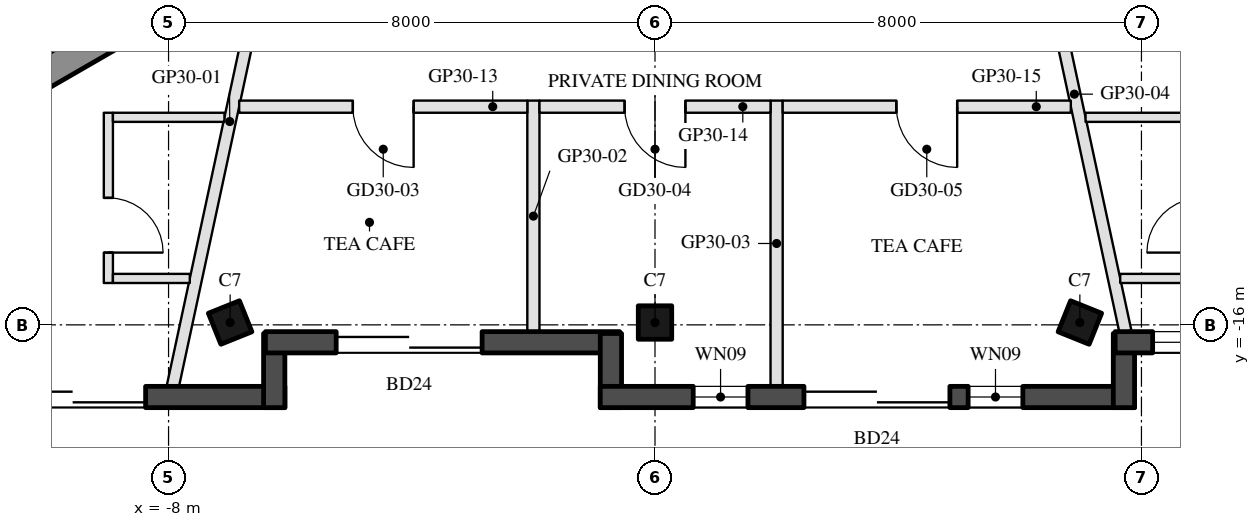
"""IFC4 building model, lengths in metres.
Left out: names, types, materials, properties, quantities, classifications, styles, units other than length and angle.
Written with IfcOpenShell. Run it as: python <this file> out.ifc"""

import sys

from ifc_helpers import new_model, si_unit, direction, frame, frame_2d, origin, origin_2d, place, context, subcontext, project, spatial, rectangle, hollow_rectangle, extrude, boolean, halfspace, element, fill, save


model = new_model("IFC4")
c1 = context("Model", 3, precision=1e-05, world=origin(), true_north=direction((0.0, 1.0)))
c2 = subcontext(c1, "Body", "Model", "MODEL_VIEW")
j1 = project(units=[si_unit("LENGTHUNIT", "METRE"), si_unit("PLANEANGLEUNIT", "RADIAN")], contexts=[c1])
p1 = place(None, origin())
s1 = spatial("IfcSite", under=j1, at=p1, CompositionType="ELEMENT")
p2 = place(p1, origin())
s2 = spatial("IfcBuilding", under=s1, at=p2, CompositionType="ELEMENT")
p3 = place(p2, frame((0.0, 0.0, 298.5)))
s3 = spatial("IfcBuildingStorey", under=s2, at=p3, CompositionType="ELEMENT", Elevation=298.5)
p4 = place(p3, frame((-6.987, -15.962, 0.0), z_axis=(0.060870463553, 0.151232178432, 0.986622326361), x_axis=(-0.998135049207, 0.004661833801, 0.060866171632)))
e1 = element("IfcColumn", 1, at=p4, inside=s3, PredefinedType="COLUMN", context=c2, shape_type="SweptSolid", body=[
    boolean("DIFFERENCE", boolean("DIFFERENCE", extrude(hollow_rectangle(XDim=0.55, YDim=0.55, WallThickness=0.025, at=origin_2d()), origin(), (0.0, 0.0, 1.0), 3.75), halfspace(frame((0.0, 0.0, 0.034), z_axis=(0.0, 0.0, 1.0), x_axis=(1.0, 0.0, 0.0)), True)), halfspace(frame((0.0, 0.0, 3.716), z_axis=(0.0, 0.0, 1.0), x_axis=(1.0, 0.0, 0.0)), False)),
])
p5 = place(p3, frame((0.0, -15.962, 0.0), z_axis=(0.0, 0.151513133163, 0.98845524455), x_axis=(-1.0, 0.0, 0.0)))
e2 = element("IfcColumn", 2, at=p5, inside=s3, PredefinedType="COLUMN", context=c2, shape_type="SweptSolid", body=[
    boolean("DIFFERENCE", boolean("DIFFERENCE", extrude(hollow_rectangle(XDim=0.55, YDim=0.55, WallThickness=0.025, at=origin_2d()), origin(), (0.0, 0.0, 1.0), 3.743), halfspace(frame((0.0, 0.0, 0.031), z_axis=(0.0, 0.0, 1.0), x_axis=(1.0, 0.0, 0.0)), True)), halfspace(frame((0.0, 0.0, 3.712), z_axis=(0.0, 0.0, 1.0), x_axis=(1.0, 0.0, 0.0)), False)),
])
p6 = place(p3, frame((6.987, -15.962, 0.0), z_axis=(-0.060870463553, 0.151232178432, 0.986622326361), x_axis=(0.998135049207, 0.004661833801, 0.060866171632)))
e3 = element("IfcColumn", 3, at=p6, inside=s3, PredefinedType="COLUMN", context=c2, shape_type="SweptSolid", body=[
    boolean("DIFFERENCE", boolean("DIFFERENCE", extrude(hollow_rectangle(XDim=0.55, YDim=0.55, WallThickness=0.025, at=origin_2d()), origin(), (0.0, 0.0, 1.0), 3.75), halfspace(frame((0.0, 0.0, 0.034), z_axis=(0.0, 0.0, 1.0), x_axis=(1.0, 0.0, 0.0)), True)), halfspace(frame((0.0, 0.0, 3.716), z_axis=(0.0, 0.0, 1.0), x_axis=(1.0, 0.0, 0.0)), False)),
])
p7 = place(p3, frame((-16.642, -17.187, 0.0), z_axis=(0.0, 0.0, 1.0), x_axis=(1.0, 0.0, 0.0)))
e4 = element("IfcWall", 4, at=p7, inside=s3, PredefinedType="SOLIDWALL", context=c2, shape_type="SweptSolid", body=[
    extrude(rectangle(XDim=10.554, YDim=0.35, at=frame_2d((5.277, 0.0))), origin(), (0.0, 0.0, 1.0), 3.55),
])
p8 = place(p7, frame((0.38, 0.0, 0.3)))
e5 = element("IfcOpeningElement", 5, at=p8, cuts=e4, PredefinedType="OPENING", context=c2, shape_type="SweptSolid", body=[
    extrude(rectangle(XDim=1.6, YDim=2.65, at=frame_2d((0.8, 1.325))), frame((0.0, 0.185, 0.0), z_axis=(0.0, -1.0, 0.0), x_axis=(1.0, 0.0, 0.0)), (0.0, 0.0, 1.0), 0.37),
])
p9 = place(p7, frame((5.864, 0.0, 0.0)))
e6 = element("IfcOpeningElement", 6, at=p9, cuts=e4, PredefinedType="OPENING", context=c2, shape_type="SweptSolid", body=[
    extrude(rectangle(XDim=2.4, YDim=2.4, at=frame_2d((1.2, 1.2))), frame((0.0, 0.185, 0.0), z_axis=(0.0, -1.0, 0.0), x_axis=(1.0, 0.0, 0.0)), (0.0, 0.0, 1.0), 0.37),
])
p10 = place(p7, frame((3.754, 0.0, 0.3)))
e7 = element("IfcOpeningElement", 7, at=p10, cuts=e4, PredefinedType="OPENING", context=c2, shape_type="SweptSolid", body=[
    extrude(rectangle(XDim=1.8, YDim=2.65, at=frame_2d((0.9, 1.325))), frame((0.0, 0.185, 0.0), z_axis=(0.0, -1.0, 0.0), x_axis=(1.0, 0.0, 0.0)), (0.0, 0.0, 1.0), 0.37),
])
p11 = place(p3, frame((-6.262, -17.362, 0.0), z_axis=(0.0, 0.0, 1.0), x_axis=(0.0, 1.0, 0.0)))
e8 = element("IfcWall", 8, at=p11, inside=s3, PredefinedType="SOLIDWALL", context=c2, shape_type="SweptSolid", body=[
    extrude(rectangle(XDim=1.22, YDim=0.35, at=frame_2d((0.61, 0.0))), origin(), (0.0, 0.0, 1.0), 3.55),
])
p12 = place(p3, frame((-6.407, -16.287, 0.0), z_axis=(0.0, 0.0, 1.0), x_axis=(1.0, 0.0, 0.0)))
e9 = element("IfcWall", 9, at=p12, inside=s3, PredefinedType="SOLIDWALL", context=c2, shape_type="SweptSolid", body=[
    extrude(rectangle(XDim=5.827, YDim=0.35, at=frame_2d((2.914, 0.0))), origin(), (0.0, 0.0, 1.0), 3.55),
])
p13 = place(p12, frame((1.164, 0.0, 0.0)))
e10 = element("IfcOpeningElement", 10, at=p13, cuts=e9, PredefinedType="OPENING", context=c2, shape_type="SweptSolid", body=[
    extrude(rectangle(XDim=2.4, YDim=2.4, at=frame_2d((1.2, 1.2))), frame((0.0, 0.185, 0.0), z_axis=(0.0, -1.0, 0.0), x_axis=(1.0, 0.0, 0.0)), (0.0, 0.0, 1.0), 0.37),
])
p14 = place(p3, frame((-0.725, -16.142, 0.0), z_axis=(0.0, 0.0, 1.0), x_axis=(0.0, -1.0, 0.0)))
e11 = element("IfcWall", 11, at=p14, inside=s3, PredefinedType="SOLIDWALL", context=c2, shape_type="SweptSolid", body=[
    extrude(rectangle(XDim=1.22, YDim=0.35, at=frame_2d((0.61, 0.0))), origin(), (0.0, 0.0, 1.0), 3.55),
])
p15 = place(p3, frame((-0.9, -17.187, 0.0), z_axis=(0.0, 0.0, 1.0), x_axis=(1.0, 0.0, 0.0)))
e12 = element("IfcWall", 12, at=p15, inside=s3, PredefinedType="SOLIDWALL", context=c2, shape_type="SweptSolid", body=[
    extrude(rectangle(XDim=8.787, YDim=0.35, at=frame_2d((4.394, 0.0))), origin(), (0.0, 0.0, 1.0), 3.55),
])
p16 = place(p15, frame((1.528, 0.0, 0.3)))
e13 = element("IfcOpeningElement", 13, at=p16, cuts=e12, PredefinedType="OPENING", context=c2, shape_type="SweptSolid", body=[
    extrude(rectangle(XDim=0.9, YDim=2.65, at=frame_2d((0.45, 1.325))), frame((0.0, 0.185, 0.0), z_axis=(0.0, -1.0, 0.0), x_axis=(1.0, 0.0, 0.0)), (0.0, 0.0, 1.0), 0.37),
])
p17 = place(p15, frame((3.35, 0.0, 0.0)))
e14 = element("IfcOpeningElement", 14, at=p17, cuts=e12, PredefinedType="OPENING", context=c2, shape_type="SweptSolid", body=[
    extrude(rectangle(XDim=2.4, YDim=2.4, at=frame_2d((1.2, 1.2))), frame((0.0, 0.185, 0.0), z_axis=(0.0, -1.0, 0.0), x_axis=(1.0, 0.0, 0.0)), (0.0, 0.0, 1.0), 0.37),
])
p18 = place(p15, frame((6.05, 0.0, 0.3)))
e15 = element("IfcOpeningElement", 15, at=p18, cuts=e12, PredefinedType="OPENING", context=c2, shape_type="SweptSolid", body=[
    extrude(rectangle(XDim=0.9, YDim=2.65, at=frame_2d((0.45, 1.325))), frame((0.0, 0.185, 0.0), z_axis=(0.0, -1.0, 0.0), x_axis=(1.0, 0.0, 0.0)), (0.0, 0.0, 1.0), 0.37),
])
p19 = place(p3, frame((7.712, -17.362, 0.0), z_axis=(0.0, 0.0, 1.0), x_axis=(0.0, 1.0, 0.0)))
e16 = element("IfcWall", 16, at=p19, inside=s3, PredefinedType="SOLIDWALL", context=c2, shape_type="SweptSolid", body=[
    extrude(rectangle(XDim=1.22, YDim=0.35, at=frame_2d((0.61, 0.0))), origin(), (0.0, 0.0, 1.0), 3.55),
])
p20 = place(p3, frame((7.567, -16.287, 0.0), z_axis=(0.0, 0.0, 1.0), x_axis=(1.0, 0.0, 0.0)))
e17 = element("IfcWall", 17, at=p20, inside=s3, PredefinedType="SOLIDWALL", context=c2, shape_type="SweptSolid", body=[
    extrude(rectangle(XDim=5.827, YDim=0.35, at=frame_2d((2.914, 0.0))), origin(), (0.0, 0.0, 1.0), 3.55),
])
p21 = place(p20, frame((3.107, 0.0, 0.0)))
e18 = element("IfcOpeningElement", 18, at=p21, cuts=e17, PredefinedType="OPENING", context=c2, shape_type="SweptSolid", body=[
    extrude(rectangle(XDim=2.4, YDim=2.4, at=frame_2d((1.2, 1.2))), frame((0.0, 0.185, 0.0), z_axis=(0.0, -1.0, 0.0), x_axis=(1.0, 0.0, 0.0)), (0.0, 0.0, 1.0), 0.37),
])
p22 = place(p20, frame((0.617, 0.0, 0.3)))
e19 = element("IfcOpeningElement", 19, at=p22, cuts=e17, PredefinedType="OPENING", context=c2, shape_type="SweptSolid", body=[
    extrude(rectangle(XDim=2.1, YDim=2.65, at=frame_2d((1.05, 1.325))), frame((0.0, 0.185, 0.0), z_axis=(0.0, -1.0, 0.0), x_axis=(1.0, 0.0, 0.0)), (0.0, 0.0, 1.0), 0.37),
])
for number, where, z_axis, x_axis in (
    (20, (-8.547, -10.997, 0.0), (0.0, 0.0, 1.0), (-0.866, -0.5, 0.0)),
    (21, (8.547, -10.997, 0.0), (0.0, 0.0, 1.0), (0.866, -0.5, 0.0)),
):
    element("IfcWall", number, at=place(p3, frame(where, z_axis=z_axis, x_axis=x_axis)), inside=s3, PredefinedType="SHEAR", context=c2, shape_type="SweptSolid", body=[
        extrude(rectangle(XDim=11.222, YDim=0.5, at=frame_2d((5.611, 0.0))), origin(), (0.0, 0.0, 1.0), 3.5),
    ])
p23 = place(p3, frame((-7.93, -17.012, 0.0), z_axis=(0.0, 0.0, 1.0), x_axis=(0.210200768645, 0.97765824134, 0.0)))
e22 = element("IfcWall", 22, at=p23, inside=s3, PredefinedType="PARTITIONING", context=c2, shape_type="SweptSolid", body=[
    extrude(rectangle(XDim=8.911, YDim=0.2, at=frame_2d((4.455, 0.0))), origin(), (0.0, 0.0, 1.0), 3.1),
])
p24 = place(p3, frame((-2.0, -16.112, 0.0), z_axis=(0.0, 0.0, 1.0), x_axis=(0.0, 1.0, 0.0)))
e23 = element("IfcWall", 23, at=p24, inside=s3, PredefinedType="PARTITIONING", context=c2, shape_type="SweptSolid", body=[
    extrude(rectangle(XDim=3.8, YDim=0.2, at=frame_2d((1.9, 0.0))), origin(), (0.0, 0.0, 1.0), 3.1),
])
p25 = place(p3, frame((2.0, -17.012, 0.0), z_axis=(0.0, 0.0, 1.0), x_axis=(0.0, 1.0, 0.0)))
e24 = element("IfcWall", 24, at=p25, inside=s3, PredefinedType="PARTITIONING", context=c2, shape_type="SweptSolid", body=[
    extrude(rectangle(XDim=4.7, YDim=0.2, at=frame_2d((2.35, 0.0))), origin(), (0.0, 0.0, 1.0), 3.1),
])
p26 = place(p3, frame((7.737, -16.112, 0.0), z_axis=(0.0, 0.0, 1.0), x_axis=(-0.210221826162, 0.977653713646, 0.0)))
e25 = element("IfcWall", 25, at=p26, inside=s3, PredefinedType="PARTITIONING", context=c2, shape_type="SweptSolid", body=[
    extrude(rectangle(XDim=7.99, YDim=0.2, at=frame_2d((3.995, 0.0))), origin(), (0.0, 0.0, 1.0), 3.1),
])
p27 = place(p3, frame((-8.99, -12.512, 0.0), z_axis=(0.0, 0.0, 1.0), x_axis=(0.0, -1.0, 0.0)))
e26 = element("IfcWall", 26, at=p27, inside=s3, PredefinedType="PARTITIONING", context=c2, shape_type="SweptSolid", body=[
    extrude(rectangle(XDim=2.8, YDim=0.15, at=frame_2d((1.4, 0.0))), origin(), (0.0, 0.0, 1.0), 3.1),
])
p28 = place(p27, frame((1.4, 0.0, 0.0)))
e27 = element("IfcOpeningElement", 27, at=p28, cuts=e26, PredefinedType="OPENING", context=c2, shape_type="SweptSolid", body=[
    extrude(rectangle(XDim=0.9, YDim=2.1, at=frame_2d((0.45, 1.05))), frame((0.0, 0.085, 0.0), z_axis=(0.0, -1.0, 0.0), x_axis=(1.0, 0.0, 0.0)), (0.0, 0.0, 1.0), 0.17),
])
p29 = place(p3, frame((-8.915, -15.237, 0.0), z_axis=(0.0, 0.0, 1.0), x_axis=(1.0, 0.0, 0.0)))
e28 = element("IfcWall", 28, at=p29, inside=s3, PredefinedType="PARTITIONING", context=c2, shape_type="SweptSolid", body=[
    extrude(rectangle(XDim=1.264, YDim=0.15, at=frame_2d((0.632, 0.0))), origin(), (0.0, 0.0, 1.0), 3.1),
])
p30 = place(p3, frame((-8.915, -12.587, 0.0), z_axis=(0.0, 0.0, 1.0), x_axis=(1.0, 0.0, 0.0)))
e29 = element("IfcWall", 29, at=p30, inside=s3, PredefinedType="PARTITIONING", context=c2, shape_type="SweptSolid", body=[
    extrude(rectangle(XDim=1.834, YDim=0.15, at=frame_2d((0.917, 0.0))), origin(), (0.0, 0.0, 1.0), 3.55),
])
p31 = place(p3, frame((-2.1, -12.412, 0.0), z_axis=(0.0, 0.0, 1.0), x_axis=(-1.0, 0.0, 0.0)))
e30 = element("IfcWall", 30, at=p31, inside=s3, PredefinedType="PARTITIONING", context=c2, shape_type="SweptSolid", body=[
    extrude(rectangle(XDim=4.739, YDim=0.2, at=frame_2d((2.369, 0.0))), origin(), (0.0, 0.0, 1.0), 3.1),
])
p32 = place(p31, frame((1.869, 0.0, 0.0)))
e31 = element("IfcOpeningElement", 31, at=p32, cuts=e30, PredefinedType="OPENING", context=c2, shape_type="SweptSolid", body=[
    extrude(rectangle(XDim=1.0, YDim=2.1, at=frame_2d((0.5, 1.05))), frame((0.0, 0.11, 0.0), z_axis=(0.0, -1.0, 0.0), x_axis=(1.0, 0.0, 0.0)), (0.0, 0.0, 1.0), 0.22),
])
p33 = place(p3, frame((1.9, -12.412, 0.0), z_axis=(0.0, 0.0, 1.0), x_axis=(-1.0, 0.0, 0.0)))
e32 = element("IfcWall", 32, at=p33, inside=s3, PredefinedType="PARTITIONING", context=c2, shape_type="SweptSolid", body=[
    extrude(rectangle(XDim=3.8, YDim=0.2, at=frame_2d((1.9, 0.0))), origin(), (0.0, 0.0, 1.0), 3.1),
])
p34 = place(p33, frame((1.4, 0.0, 0.0)))
e33 = element("IfcOpeningElement", 33, at=p34, cuts=e32, PredefinedType="OPENING", context=c2, shape_type="SweptSolid", body=[
    extrude(rectangle(XDim=1.0, YDim=2.1, at=frame_2d((0.5, 1.05))), frame((0.0, 0.11, 0.0), z_axis=(0.0, -1.0, 0.0), x_axis=(1.0, 0.0, 0.0)), (0.0, 0.0, 1.0), 0.22),
])
p35 = place(p3, frame((6.839, -12.412, 0.0), z_axis=(0.0, 0.0, 1.0), x_axis=(-1.0, 0.0, 0.0)))
e34 = element("IfcWall", 34, at=p35, inside=s3, PredefinedType="PARTITIONING", context=c2, shape_type="SweptSolid", body=[
    extrude(rectangle(XDim=4.739, YDim=0.2, at=frame_2d((2.369, 0.0))), origin(), (0.0, 0.0, 1.0), 3.1),
])
p36 = place(p35, frame((1.869, 0.0, 0.0)))
e35 = element("IfcOpeningElement", 35, at=p36, cuts=e34, PredefinedType="OPENING", context=c2, shape_type="SweptSolid", body=[
    extrude(rectangle(XDim=1.0, YDim=2.1, at=frame_2d((0.5, 1.05))), frame((0.0, 0.11, 0.0), z_axis=(0.0, -1.0, 0.0), x_axis=(1.0, 0.0, 0.0)), (0.0, 0.0, 1.0), 0.22),
])
p37 = place(p3, frame((7.651, -15.237, 0.0), z_axis=(0.0, 0.0, 1.0), x_axis=(1.0, 0.0, 0.0)))
e36 = element("IfcWall", 36, at=p37, inside=s3, PredefinedType="PARTITIONING", context=c2, shape_type="SweptSolid", body=[
    extrude(rectangle(XDim=1.264, YDim=0.15, at=frame_2d((0.632, 0.0))), origin(), (0.0, 0.0, 1.0), 3.1),
])
p38 = place(p3, frame((7.081, -12.587, 0.0), z_axis=(0.0, 0.0, 1.0), x_axis=(1.0, 0.0, 0.0)))
e37 = element("IfcWall", 37, at=p38, inside=s3, PredefinedType="PARTITIONING", context=c2, shape_type="SweptSolid", body=[
    extrude(rectangle(XDim=1.834, YDim=0.15, at=frame_2d((0.917, 0.0))), origin(), (0.0, 0.0, 1.0), 3.55),
])
p39 = place(p9, frame((2.4, 0.0, 0.0), z_axis=(0.0, 0.0, 1.0), x_axis=(-1.0, 0.0, 0.0)))
e38 = element("IfcDoor", 38, at=p39, inside=s3, OperationType="SLIDING_TO_LEFT", PredefinedType="DOOR", context=c2, shape_type="SweptSolid", body=[
    extrude(rectangle(XDim=2.4, YDim=2.4, at=frame_2d((1.2, 1.2))), frame((0.0, 0.025, 0.0), z_axis=(0.0, -1.0, 0.0), x_axis=(1.0, 0.0, 0.0)), (0.0, 0.0, 1.0), 0.05),
])
fill(e6, e38)
p40 = place(p13, frame((2.4, 0.0, 0.0), z_axis=(0.0, 0.0, 1.0), x_axis=(-1.0, 0.0, 0.0)))
e39 = element("IfcDoor", 39, at=p40, inside=s3, OperationType="SLIDING_TO_LEFT", PredefinedType="DOOR", context=c2, shape_type="SweptSolid", body=[
    extrude(rectangle(XDim=2.4, YDim=2.4, at=frame_2d((1.2, 1.2))), frame((0.0, 0.025, 0.0), z_axis=(0.0, -1.0, 0.0), x_axis=(1.0, 0.0, 0.0)), (0.0, 0.0, 1.0), 0.05),
])
fill(e10, e39)
p41 = place(p16, origin())
e40 = element("IfcWindow", 40, at=p41, inside=s3, PartitioningType="SINGLE_PANEL", PredefinedType="WINDOW", context=c2, shape_type="SweptSolid", body=[
    extrude(rectangle(XDim=0.9, YDim=2.65, at=frame_2d((0.45, 1.325))), frame((0.0, 0.03, 0.0), z_axis=(0.0, -1.0, 0.0), x_axis=(1.0, 0.0, 0.0)), (0.0, 0.0, 1.0), 0.06),
])
fill(e13, e40)
p42 = place(p17, frame((2.4, 0.0, 0.0), z_axis=(0.0, 0.0, 1.0), x_axis=(-1.0, 0.0, 0.0)))
e41 = element("IfcDoor", 41, at=p42, inside=s3, OperationType="SLIDING_TO_LEFT", PredefinedType="DOOR", context=c2, shape_type="SweptSolid", body=[
    extrude(rectangle(XDim=2.4, YDim=2.4, at=frame_2d((1.2, 1.2))), frame((0.0, 0.025, 0.0), z_axis=(0.0, -1.0, 0.0), x_axis=(1.0, 0.0, 0.0)), (0.0, 0.0, 1.0), 0.05),
])
fill(e14, e41)
p43 = place(p18, origin())
e42 = element("IfcWindow", 42, at=p43, inside=s3, PartitioningType="SINGLE_PANEL", PredefinedType="WINDOW", context=c2, shape_type="SweptSolid", body=[
    extrude(rectangle(XDim=0.9, YDim=2.65, at=frame_2d((0.45, 1.325))), frame((0.0, 0.03, 0.0), z_axis=(0.0, -1.0, 0.0), x_axis=(1.0, 0.0, 0.0)), (0.0, 0.0, 1.0), 0.06),
])
fill(e15, e42)
p44 = place(p22, origin())
e43 = element("IfcWindow", 43, at=p44, inside=s3, PartitioningType="SINGLE_PANEL", PredefinedType="WINDOW", context=c2, shape_type="SweptSolid", body=[
    extrude(rectangle(XDim=2.1, YDim=2.65, at=frame_2d((1.05, 1.325))), frame((0.0, 0.03, 0.0), z_axis=(0.0, -1.0, 0.0), x_axis=(1.0, 0.0, 0.0)), (0.0, 0.0, 1.0), 0.06),
])
fill(e19, e43)
p45 = place(p28, origin())
e44 = element("IfcDoor", 44, at=p45, inside=s3, OperationType="SINGLE_SWING_RIGHT", PredefinedType="DOOR", context=c2, shape_type="SweptSolid", body=[
    extrude(rectangle(XDim=0.9, YDim=2.1, at=frame_2d((0.45, 1.05))), frame((0.0, 0.025, 0.0), z_axis=(0.0, -1.0, 0.0), x_axis=(1.0, 0.0, 0.0)), (0.0, 0.0, 1.0), 0.05),
])
fill(e27, e44)
p46 = place(p32, origin())
e45 = element("IfcDoor", 45, at=p46, inside=s3, OperationType="SINGLE_SWING_LEFT", PredefinedType="DOOR", context=c2, shape_type="SweptSolid", body=[
    extrude(rectangle(XDim=1.0, YDim=2.1, at=frame_2d((0.5, 1.05))), frame((0.0, 0.025, 0.0), z_axis=(0.0, -1.0, 0.0), x_axis=(1.0, 0.0, 0.0)), (0.0, 0.0, 1.0), 0.05),
])
fill(e31, e45)
p47 = place(p34, origin())
e46 = element("IfcDoor", 46, at=p47, inside=s3, OperationType="SINGLE_SWING_LEFT", PredefinedType="DOOR", context=c2, shape_type="SweptSolid", body=[
    extrude(rectangle(XDim=1.0, YDim=2.1, at=frame_2d((0.5, 1.05))), frame((0.0, 0.025, 0.0), z_axis=(0.0, -1.0, 0.0), x_axis=(1.0, 0.0, 0.0)), (0.0, 0.0, 1.0), 0.05),
])
fill(e33, e46)
p48 = place(p36, origin())
e47 = element("IfcDoor", 47, at=p48, inside=s3, OperationType="SINGLE_SWING_LEFT", PredefinedType="DOOR", context=c2, shape_type="SweptSolid", body=[
    extrude(rectangle(XDim=1.0, YDim=2.1, at=frame_2d((0.5, 1.05))), frame((0.0, 0.025, 0.0), z_axis=(0.0, -1.0, 0.0), x_axis=(1.0, 0.0, 0.0)), (0.0, 0.0, 1.0), 0.05),
])
fill(e35, e47)
save(model, sys.argv[1])
